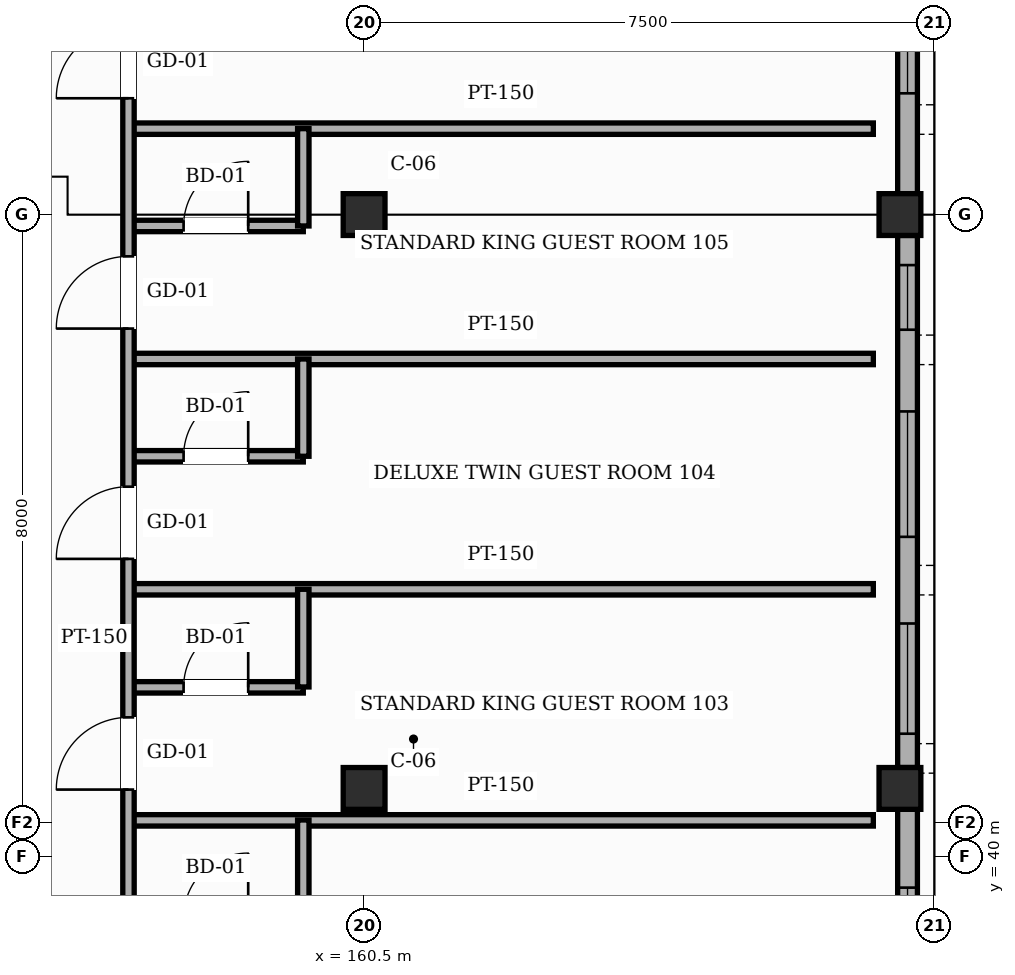
"""IFC4 building model, lengths in metres.
Left out: names, types, materials, properties, quantities, classifications, styles, units other than length and angle.
Written with IfcOpenShell. Run it as: python <this file> out.ifc"""

import sys

from ifc_helpers import new_model, si_unit, direction, frame, frame_2d, origin, origin_2d, place, context, subcontext, project, spatial, rectangle, hollow_rectangle, extrude, element, fill, save


model = new_model("IFC4")
c1 = context("Model", 3, precision=1e-05, world=origin(), true_north=direction((0.0, 1.0)))
c2 = subcontext(c1, "Body", "Model", "MODEL_VIEW")
j1 = project(units=[si_unit("LENGTHUNIT", "METRE"), si_unit("PLANEANGLEUNIT", "RADIAN")], contexts=[c1])
p1 = place(None, origin())
s1 = spatial("IfcSite", under=j1, at=p1, CompositionType="ELEMENT")
p2 = place(p1, origin())
s2 = spatial("IfcBuilding", under=s1, at=p2, CompositionType="ELEMENT")
p3 = place(p2, frame((0.0, 0.0, 24.6)))
s3 = spatial("IfcBuildingStorey", under=s2, at=p3, CompositionType="ELEMENT", Elevation=24.6)
for number, where, z_axis, x_axis in (
    (1, (160.5, 40.9, 0.0), (0.0, 0.0, 1.0), (1.0, 0.0, 0.0)),
    (2, (160.5, 48.45, 0.0), (0.0, 0.0, 1.0), (1.0, 0.0, 0.0)),
    (3, (167.55, 40.9, 0.0), (0.0, 0.0, 1.0), (1.0, 0.0, 0.0)),
    (4, (167.55, 48.45, 0.0), (0.0, 0.0, 1.0), (1.0, 0.0, 0.0)),
):
    element("IfcColumn", number, at=place(p3, frame(where, z_axis=z_axis, x_axis=x_axis)), inside=s3, PredefinedType="COLUMN", context=c2, shape_type="SweptSolid", body=[
        extrude(hollow_rectangle(XDim=0.55, YDim=0.55, WallThickness=0.022, InnerFilletRadius=0.022, OuterFilletRadius=0.044, at=origin_2d()), origin(), (0.0, 0.0, 1.0), 3.6),
    ])
p4 = place(p3, frame((167.65, 40.625, 0.0), z_axis=(0.0, 0.0, 1.0), x_axis=(0.0, -1.0, 0.0)))
e5 = element("IfcWall", 5, at=p4, inside=s3, PredefinedType="SOLIDWALL", context=c2, shape_type="SweptSolid", body=[
    extrude(rectangle(XDim=8.35, YDim=0.26, at=frame_2d((4.175, 0.0))), origin(), (0.0, 0.0, 1.0), 2.755),
])
p5 = place(p4, frame((6.85, 0.0, 0.85)))
e6 = element("IfcOpeningElement", 6, at=p5, cuts=e5, PredefinedType="OPENING", context=c2, shape_type="SweptSolid", body=[
    extrude(rectangle(XDim=0.85, YDim=1.35, at=frame_2d((0.425, 0.675))), frame((0.0, 0.14, 0.0), z_axis=(0.0, -1.0, 0.0), x_axis=(1.0, 0.0, 0.0)), (0.0, 0.0, 1.0), 0.28),
])
p6 = place(p4, frame((3.56, 0.0, 0.85)))
e7 = element("IfcOpeningElement", 7, at=p6, cuts=e5, PredefinedType="OPENING", context=c2, shape_type="SweptSolid", body=[
    extrude(rectangle(XDim=2.25, YDim=1.35, at=frame_2d((1.125, 0.675))), frame((0.0, 0.14, 0.0), z_axis=(0.0, -1.0, 0.0), x_axis=(1.0, 0.0, 0.0)), (0.0, 0.0, 1.0), 0.28),
])
p7 = place(p4, frame((1.03, 0.0, 0.85)))
e8 = element("IfcOpeningElement", 8, at=p7, cuts=e5, PredefinedType="OPENING", context=c2, shape_type="SweptSolid", body=[
    extrude(rectangle(XDim=1.25, YDim=1.35, at=frame_2d((0.625, 0.675))), frame((0.0, 0.14, 0.0), z_axis=(0.0, -1.0, 0.0), x_axis=(1.0, 0.0, 0.0)), (0.0, 0.0, 1.0), 0.28),
])
p8 = place(p3, frame((167.65, 48.175, 0.0), z_axis=(0.0, 0.0, 1.0), x_axis=(0.0, -1.0, 0.0)))
e9 = element("IfcWall", 9, at=p8, inside=s3, PredefinedType="SOLIDWALL", context=c2, shape_type="SweptSolid", body=[
    extrude(rectangle(XDim=7.0, YDim=0.26, at=frame_2d((3.5, 0.0))), origin(), (0.0, 0.0, 1.0), 2.755),
])
p9 = place(p8, frame((5.105, 0.0, 0.85)))
e10 = element("IfcOpeningElement", 10, at=p9, cuts=e9, PredefinedType="OPENING", context=c2, shape_type="SweptSolid", body=[
    extrude(rectangle(XDim=1.45, YDim=1.35, at=frame_2d((0.725, 0.675))), frame((0.0, 0.14, 0.0), z_axis=(0.0, -1.0, 0.0), x_axis=(1.0, 0.0, 0.0)), (0.0, 0.0, 1.0), 0.28),
])
p10 = place(p8, frame((2.315, 0.0, 0.85)))
e11 = element("IfcOpeningElement", 11, at=p10, cuts=e9, PredefinedType="OPENING", context=c2, shape_type="SweptSolid", body=[
    extrude(rectangle(XDim=1.65, YDim=1.35, at=frame_2d((0.825, 0.675))), frame((0.0, 0.14, 0.0), z_axis=(0.0, -1.0, 0.0), x_axis=(1.0, 0.0, 0.0)), (0.0, 0.0, 1.0), 0.28),
])
p11 = place(p8, frame((0.39, 0.0, 0.85)))
e12 = element("IfcOpeningElement", 12, at=p11, cuts=e9, PredefinedType="OPENING", context=c2, shape_type="SweptSolid", body=[
    extrude(rectangle(XDim=0.85, YDim=1.35, at=frame_2d((0.425, 0.675))), frame((0.0, 0.14, 0.0), z_axis=(0.0, -1.0, 0.0), x_axis=(1.0, 0.0, 0.0)), (0.0, 0.0, 1.0), 0.28),
])
p12 = place(p3, frame((167.65, 56.175, 0.0), z_axis=(0.0, 0.0, 1.0), x_axis=(0.0, -1.0, 0.0)))
e13 = element("IfcWall", 13, at=p12, inside=s3, PredefinedType="SOLIDWALL", context=c2, shape_type="SweptSolid", body=[
    extrude(rectangle(XDim=7.45, YDim=0.26, at=frame_2d((3.725, 0.0))), origin(), (0.0, 0.0, 1.0), 2.755),
])
p13 = place(p12, frame((4.03, 0.0, 0.85)))
e14 = element("IfcOpeningElement", 14, at=p13, cuts=e13, PredefinedType="OPENING", context=c2, shape_type="SweptSolid", body=[
    extrude(rectangle(XDim=2.1, YDim=1.35, at=frame_2d((1.05, 0.675))), frame((0.0, 0.14, 0.0), z_axis=(0.0, -1.0, 0.0), x_axis=(1.0, 0.0, 0.0)), (0.0, 0.0, 1.0), 0.28),
])
p14 = place(p12, frame((1.47, 0.0, 0.85)))
e15 = element("IfcOpeningElement", 15, at=p14, cuts=e13, PredefinedType="OPENING", context=c2, shape_type="SweptSolid", body=[
    extrude(rectangle(XDim=1.15, YDim=1.5, at=frame_2d((0.575, 0.75))), frame((0.0, 0.14, 0.0), z_axis=(0.0, -1.0, 0.0), x_axis=(1.0, 0.0, 0.0)), (0.0, 0.0, 1.0), 0.28),
])
p15 = place(p3, frame((157.4, 40.48, 0.0), z_axis=(0.0, 0.0, 1.0), x_axis=(1.0, 0.0, 0.0)))
e16 = element("IfcWall", 16, at=p15, inside=s3, PredefinedType="PARTITIONING", context=c2, shape_type="SweptSolid", body=[
    extrude(rectangle(XDim=9.8, YDim=0.15, at=frame_2d((4.9, 0.0))), origin(), (0.0, 0.0, 1.0), 3.365),
])
p16 = place(p3, frame((157.4, 42.23, 0.0), z_axis=(0.0, 0.0, 1.0), x_axis=(1.0, 0.0, 0.0)))
e17 = element("IfcWall", 17, at=p16, inside=s3, PredefinedType="PARTITIONING", context=c2, shape_type="SweptSolid", body=[
    extrude(rectangle(XDim=2.3, YDim=0.15, at=frame_2d((1.15, 0.0))), origin(), (0.0, 0.0, 1.0), 3.365),
])
p17 = place(p16, frame((0.725, 0.0, 0.0)))
e18 = element("IfcOpeningElement", 18, at=p17, cuts=e17, PredefinedType="OPENING", context=c2, shape_type="SweptSolid", body=[
    extrude(rectangle(XDim=0.85, YDim=2.1, at=frame_2d((0.425, 1.05))), frame((0.0, 0.085, 0.0), z_axis=(0.0, -1.0, 0.0), x_axis=(1.0, 0.0, 0.0)), (0.0, 0.0, 1.0), 0.17),
])
p18 = place(p3, frame((157.4, 43.52, 0.0), z_axis=(0.0, 0.0, 1.0), x_axis=(1.0, 0.0, 0.0)))
e19 = element("IfcWall", 19, at=p18, inside=s3, PredefinedType="PARTITIONING", context=c2, shape_type="SweptSolid", body=[
    extrude(rectangle(XDim=9.8, YDim=0.15, at=frame_2d((4.9, 0.0))), origin(), (0.0, 0.0, 1.0), 3.365),
])
p19 = place(p3, frame((157.4, 45.27, 0.0), z_axis=(0.0, 0.0, 1.0), x_axis=(1.0, 0.0, 0.0)))
e20 = element("IfcWall", 20, at=p19, inside=s3, PredefinedType="PARTITIONING", context=c2, shape_type="SweptSolid", body=[
    extrude(rectangle(XDim=2.3, YDim=0.15, at=frame_2d((1.15, 0.0))), origin(), (0.0, 0.0, 1.0), 3.365),
])
p20 = place(p19, frame((0.725, 0.0, 0.0)))
e21 = element("IfcOpeningElement", 21, at=p20, cuts=e20, PredefinedType="OPENING", context=c2, shape_type="SweptSolid", body=[
    extrude(rectangle(XDim=0.85, YDim=2.1, at=frame_2d((0.425, 1.05))), frame((0.0, 0.085, 0.0), z_axis=(0.0, -1.0, 0.0), x_axis=(1.0, 0.0, 0.0)), (0.0, 0.0, 1.0), 0.17),
])
p21 = place(p3, frame((157.4, 46.55, 0.0), z_axis=(0.0, 0.0, 1.0), x_axis=(1.0, 0.0, 0.0)))
e22 = element("IfcWall", 22, at=p21, inside=s3, PredefinedType="PARTITIONING", context=c2, shape_type="SweptSolid", body=[
    extrude(rectangle(XDim=9.8, YDim=0.15, at=frame_2d((4.9, 0.0))), origin(), (0.0, 0.0, 1.0), 3.365),
])
p22 = place(p3, frame((157.4, 48.3, 0.0), z_axis=(0.0, 0.0, 1.0), x_axis=(1.0, 0.0, 0.0)))
e23 = element("IfcWall", 23, at=p22, inside=s3, PredefinedType="PARTITIONING", context=c2, shape_type="SweptSolid", body=[
    extrude(rectangle(XDim=2.3, YDim=0.15, at=frame_2d((1.15, 0.0))), origin(), (0.0, 0.0, 1.0), 3.365),
])
p23 = place(p22, frame((0.725, 0.0, 0.0)))
e24 = element("IfcOpeningElement", 24, at=p23, cuts=e23, PredefinedType="OPENING", context=c2, shape_type="SweptSolid", body=[
    extrude(rectangle(XDim=0.85, YDim=2.1, at=frame_2d((0.425, 1.05))), frame((0.0, 0.085, 0.0), z_axis=(0.0, -1.0, 0.0), x_axis=(1.0, 0.0, 0.0)), (0.0, 0.0, 1.0), 0.17),
])
p24 = place(p3, frame((157.4, 49.58, 0.0), z_axis=(0.0, 0.0, 1.0), x_axis=(1.0, 0.0, 0.0)))
e25 = element("IfcWall", 25, at=p24, inside=s3, PredefinedType="PARTITIONING", context=c2, shape_type="SweptSolid", body=[
    extrude(rectangle(XDim=9.8, YDim=0.15, at=frame_2d((4.9, 0.0))), origin(), (0.0, 0.0, 1.0), 3.365),
])
p25 = place(p3, frame((157.4, 22.3, 0.0), z_axis=(0.0, 0.0, 1.0), x_axis=(0.0, 1.0, 0.0)))
e26 = element("IfcWall", 26, at=p25, inside=s3, PredefinedType="PARTITIONING", context=c2, shape_type="SweptSolid", body=[
    extrude(rectangle(XDim=48.5, YDim=0.15, at=frame_2d((24.25, 0.0))), origin(), (0.0, 0.0, 1.0), 3.365),
])
p26 = place(p25, frame((0.4, 0.0, 0.0)))
e27 = element("IfcOpeningElement", 27, at=p26, cuts=e26, PredefinedType="OPENING", context=c2, shape_type="SweptSolid", body=[
    extrude(rectangle(XDim=0.95, YDim=2.15, at=frame_2d((0.475, 1.075))), frame((0.0, 0.085, 0.0), z_axis=(0.0, -1.0, 0.0), x_axis=(1.0, 0.0, 0.0)), (0.0, 0.0, 1.0), 0.17),
])
p27 = place(p25, frame((3.43, 0.0, 0.0)))
e28 = element("IfcOpeningElement", 28, at=p27, cuts=e26, PredefinedType="OPENING", context=c2, shape_type="SweptSolid", body=[
    extrude(rectangle(XDim=0.95, YDim=2.15, at=frame_2d((0.475, 1.075))), frame((0.0, 0.085, 0.0), z_axis=(0.0, -1.0, 0.0), x_axis=(1.0, 0.0, 0.0)), (0.0, 0.0, 1.0), 0.17),
])
p28 = place(p25, frame((6.46, 0.0, 0.0)))
e29 = element("IfcOpeningElement", 29, at=p28, cuts=e26, PredefinedType="OPENING", context=c2, shape_type="SweptSolid", body=[
    extrude(rectangle(XDim=0.95, YDim=2.15, at=frame_2d((0.475, 1.075))), frame((0.0, 0.085, 0.0), z_axis=(0.0, -1.0, 0.0), x_axis=(1.0, 0.0, 0.0)), (0.0, 0.0, 1.0), 0.17),
])
p29 = place(p25, frame((9.495, 0.0, 0.0)))
e30 = element("IfcOpeningElement", 30, at=p29, cuts=e26, PredefinedType="OPENING", context=c2, shape_type="SweptSolid", body=[
    extrude(rectangle(XDim=0.95, YDim=2.15, at=frame_2d((0.475, 1.075))), frame((0.0, 0.085, 0.0), z_axis=(0.0, -1.0, 0.0), x_axis=(1.0, 0.0, 0.0)), (0.0, 0.0, 1.0), 0.17),
])
p30 = place(p25, frame((12.525, 0.0, 0.0)))
e31 = element("IfcOpeningElement", 31, at=p30, cuts=e26, PredefinedType="OPENING", context=c2, shape_type="SweptSolid", body=[
    extrude(rectangle(XDim=0.95, YDim=2.15, at=frame_2d((0.475, 1.075))), frame((0.0, 0.085, 0.0), z_axis=(0.0, -1.0, 0.0), x_axis=(1.0, 0.0, 0.0)), (0.0, 0.0, 1.0), 0.17),
])
p31 = place(p25, frame((15.555, 0.0, 0.0)))
e32 = element("IfcOpeningElement", 32, at=p31, cuts=e26, PredefinedType="OPENING", context=c2, shape_type="SweptSolid", body=[
    extrude(rectangle(XDim=0.95, YDim=2.15, at=frame_2d((0.475, 1.075))), frame((0.0, 0.085, 0.0), z_axis=(0.0, -1.0, 0.0), x_axis=(1.0, 0.0, 0.0)), (0.0, 0.0, 1.0), 0.17),
])
p32 = place(p25, frame((18.585, 0.0, 0.0)))
e33 = element("IfcOpeningElement", 33, at=p32, cuts=e26, PredefinedType="OPENING", context=c2, shape_type="SweptSolid", body=[
    extrude(rectangle(XDim=0.95, YDim=2.15, at=frame_2d((0.475, 1.075))), frame((0.0, 0.085, 0.0), z_axis=(0.0, -1.0, 0.0), x_axis=(1.0, 0.0, 0.0)), (0.0, 0.0, 1.0), 0.17),
])
p33 = place(p25, frame((21.62, 0.0, 0.0)))
e34 = element("IfcOpeningElement", 34, at=p33, cuts=e26, PredefinedType="OPENING", context=c2, shape_type="SweptSolid", body=[
    extrude(rectangle(XDim=0.95, YDim=2.15, at=frame_2d((0.475, 1.075))), frame((0.0, 0.085, 0.0), z_axis=(0.0, -1.0, 0.0), x_axis=(1.0, 0.0, 0.0)), (0.0, 0.0, 1.0), 0.17),
])
p34 = place(p25, frame((24.65, 0.0, 0.0)))
e35 = element("IfcOpeningElement", 35, at=p34, cuts=e26, PredefinedType="OPENING", context=c2, shape_type="SweptSolid", body=[
    extrude(rectangle(XDim=0.95, YDim=2.15, at=frame_2d((0.475, 1.075))), frame((0.0, 0.085, 0.0), z_axis=(0.0, -1.0, 0.0), x_axis=(1.0, 0.0, 0.0)), (0.0, 0.0, 1.0), 0.17),
])
p35 = place(p25, frame((27.68, 0.0, 0.0)))
e36 = element("IfcOpeningElement", 36, at=p35, cuts=e26, PredefinedType="OPENING", context=c2, shape_type="SweptSolid", body=[
    extrude(rectangle(XDim=0.95, YDim=2.15, at=frame_2d((0.475, 1.075))), frame((0.0, 0.085, 0.0), z_axis=(0.0, -1.0, 0.0), x_axis=(1.0, 0.0, 0.0)), (0.0, 0.0, 1.0), 0.17),
])
p36 = place(p25, frame((30.71, 0.0, 0.0)))
e37 = element("IfcOpeningElement", 37, at=p36, cuts=e26, PredefinedType="OPENING", context=c2, shape_type="SweptSolid", body=[
    extrude(rectangle(XDim=0.95, YDim=2.15, at=frame_2d((0.475, 1.075))), frame((0.0, 0.085, 0.0), z_axis=(0.0, -1.0, 0.0), x_axis=(1.0, 0.0, 0.0)), (0.0, 0.0, 1.0), 0.17),
])
p37 = place(p25, frame((33.745, 0.0, 0.0)))
e38 = element("IfcOpeningElement", 38, at=p37, cuts=e26, PredefinedType="OPENING", context=c2, shape_type="SweptSolid", body=[
    extrude(rectangle(XDim=0.95, YDim=2.15, at=frame_2d((0.475, 1.075))), frame((0.0, 0.085, 0.0), z_axis=(0.0, -1.0, 0.0), x_axis=(1.0, 0.0, 0.0)), (0.0, 0.0, 1.0), 0.17),
])
p38 = place(p25, frame((36.775, 0.0, 0.0)))
e39 = element("IfcOpeningElement", 39, at=p38, cuts=e26, PredefinedType="OPENING", context=c2, shape_type="SweptSolid", body=[
    extrude(rectangle(XDim=0.95, YDim=2.15, at=frame_2d((0.475, 1.075))), frame((0.0, 0.085, 0.0), z_axis=(0.0, -1.0, 0.0), x_axis=(1.0, 0.0, 0.0)), (0.0, 0.0, 1.0), 0.17),
])
p39 = place(p25, frame((39.805, 0.0, 0.0)))
e40 = element("IfcOpeningElement", 40, at=p39, cuts=e26, PredefinedType="OPENING", context=c2, shape_type="SweptSolid", body=[
    extrude(rectangle(XDim=0.95, YDim=2.15, at=frame_2d((0.475, 1.075))), frame((0.0, 0.085, 0.0), z_axis=(0.0, -1.0, 0.0), x_axis=(1.0, 0.0, 0.0)), (0.0, 0.0, 1.0), 0.17),
])
p40 = place(p25, frame((42.84, 0.0, 0.0)))
e41 = element("IfcOpeningElement", 41, at=p40, cuts=e26, PredefinedType="OPENING", context=c2, shape_type="SweptSolid", body=[
    extrude(rectangle(XDim=0.95, YDim=2.15, at=frame_2d((0.475, 1.075))), frame((0.0, 0.085, 0.0), z_axis=(0.0, -1.0, 0.0), x_axis=(1.0, 0.0, 0.0)), (0.0, 0.0, 1.0), 0.17),
])
p41 = place(p25, frame((45.87, 0.0, 0.0)))
e42 = element("IfcOpeningElement", 42, at=p41, cuts=e26, PredefinedType="OPENING", context=c2, shape_type="SweptSolid", body=[
    extrude(rectangle(XDim=0.95, YDim=2.15, at=frame_2d((0.475, 1.075))), frame((0.0, 0.085, 0.0), z_axis=(0.0, -1.0, 0.0), x_axis=(1.0, 0.0, 0.0)), (0.0, 0.0, 1.0), 0.17),
])
p42 = place(p3, frame((159.7, 39.205, 0.0), z_axis=(0.0, 0.0, 1.0), x_axis=(0.0, 1.0, 0.0)))
e43 = element("IfcWall", 43, at=p42, inside=s3, PredefinedType="PARTITIONING", context=c2, shape_type="SweptSolid", body=[
    extrude(rectangle(XDim=1.28, YDim=0.15, at=frame_2d((0.64, 0.0))), origin(), (0.0, 0.0, 1.0), 3.365),
])
p43 = place(p3, frame((159.7, 42.235, 0.0), z_axis=(0.0, 0.0, 1.0), x_axis=(0.0, 1.0, 0.0)))
e44 = element("IfcWall", 44, at=p43, inside=s3, PredefinedType="PARTITIONING", context=c2, shape_type="SweptSolid", body=[
    extrude(rectangle(XDim=1.285, YDim=0.15, at=frame_2d((0.643, 0.0))), origin(), (0.0, 0.0, 1.0), 3.365),
])
for number, where, z_axis, x_axis in (
    (45, (159.7, 45.27, 0.0), (0.0, 0.0, 1.0), (0.0, 1.0, 0.0)),
    (46, (159.7, 48.3, 0.0), (0.0, 0.0, 1.0), (0.0, 1.0, 0.0)),
):
    element("IfcWall", number, at=place(p3, frame(where, z_axis=z_axis, x_axis=x_axis)), inside=s3, PredefinedType="PARTITIONING", context=c2, shape_type="SweptSolid", body=[
        extrude(rectangle(XDim=1.28, YDim=0.15, at=frame_2d((0.64, 0.0))), origin(), (0.0, 0.0, 1.0), 3.365),
    ])
p44 = place(p7, origin())
e47 = element("IfcWindow", 47, at=p44, inside=s3, PartitioningType="SINGLE_PANEL", PredefinedType="WINDOW", context=c2, shape_type="SweptSolid", body=[
    extrude(rectangle(XDim=1.25, YDim=1.35, at=frame_2d((0.625, 0.675))), frame((0.0, 0.03, 0.0), z_axis=(0.0, -1.0, 0.0), x_axis=(1.0, 0.0, 0.0)), (0.0, 0.0, 1.0), 0.06),
])
fill(e8, e47)
p45 = place(p9, origin())
e48 = element("IfcWindow", 48, at=p45, inside=s3, PartitioningType="SINGLE_PANEL", PredefinedType="WINDOW", context=c2, shape_type="SweptSolid", body=[
    extrude(rectangle(XDim=1.45, YDim=1.35, at=frame_2d((0.725, 0.675))), frame((0.0, 0.03, 0.0), z_axis=(0.0, -1.0, 0.0), x_axis=(1.0, 0.0, 0.0)), (0.0, 0.0, 1.0), 0.06),
])
fill(e10, e48)
p46 = place(p10, origin())
e49 = element("IfcWindow", 49, at=p46, inside=s3, PartitioningType="SINGLE_PANEL", PredefinedType="WINDOW", context=c2, shape_type="SweptSolid", body=[
    extrude(rectangle(XDim=1.65, YDim=1.35, at=frame_2d((0.825, 0.675))), frame((0.0, 0.03, 0.0), z_axis=(0.0, -1.0, 0.0), x_axis=(1.0, 0.0, 0.0)), (0.0, 0.0, 1.0), 0.06),
])
fill(e11, e49)
p47 = place(p11, origin())
e50 = element("IfcWindow", 50, at=p47, inside=s3, PartitioningType="SINGLE_PANEL", PredefinedType="WINDOW", context=c2, shape_type="SweptSolid", body=[
    extrude(rectangle(XDim=0.85, YDim=1.35, at=frame_2d((0.425, 0.675))), frame((0.0, 0.03, 0.0), z_axis=(0.0, -1.0, 0.0), x_axis=(1.0, 0.0, 0.0)), (0.0, 0.0, 1.0), 0.06),
])
fill(e12, e50)
p48 = place(p13, origin())
e51 = element("IfcWindow", 51, at=p48, inside=s3, PartitioningType="SINGLE_PANEL", PredefinedType="WINDOW", context=c2, shape_type="SweptSolid", body=[
    extrude(rectangle(XDim=2.1, YDim=1.35, at=frame_2d((1.05, 0.675))), frame((0.0, 0.03, 0.0), z_axis=(0.0, -1.0, 0.0), x_axis=(1.0, 0.0, 0.0)), (0.0, 0.0, 1.0), 0.06),
])
fill(e14, e51)
p49 = place(p32, origin())
e52 = element("IfcDoor", 52, at=p49, inside=s3, OperationType="SINGLE_SWING_LEFT", PredefinedType="DOOR", context=c2, shape_type="SweptSolid", body=[
    extrude(rectangle(XDim=0.95, YDim=2.15, at=frame_2d((0.475, 1.075))), frame((0.0, 0.025, 0.0), z_axis=(0.0, -1.0, 0.0), x_axis=(1.0, 0.0, 0.0)), (0.0, 0.0, 1.0), 0.05),
])
fill(e33, e52)
p50 = place(p17, origin())
e53 = element("IfcDoor", 53, at=p50, inside=s3, OperationType="SINGLE_SWING_RIGHT", PredefinedType="DOOR", context=c2, shape_type="SweptSolid", body=[
    extrude(rectangle(XDim=0.85, YDim=2.1, at=frame_2d((0.425, 1.05))), frame((0.0, 0.025, 0.0), z_axis=(0.0, -1.0, 0.0), x_axis=(1.0, 0.0, 0.0)), (0.0, 0.0, 1.0), 0.05),
])
fill(e18, e53)
p51 = place(p33, origin())
e54 = element("IfcDoor", 54, at=p51, inside=s3, OperationType="SINGLE_SWING_LEFT", PredefinedType="DOOR", context=c2, shape_type="SweptSolid", body=[
    extrude(rectangle(XDim=0.95, YDim=2.15, at=frame_2d((0.475, 1.075))), frame((0.0, 0.025, 0.0), z_axis=(0.0, -1.0, 0.0), x_axis=(1.0, 0.0, 0.0)), (0.0, 0.0, 1.0), 0.05),
])
fill(e34, e54)
p52 = place(p20, origin())
e55 = element("IfcDoor", 55, at=p52, inside=s3, OperationType="SINGLE_SWING_RIGHT", PredefinedType="DOOR", context=c2, shape_type="SweptSolid", body=[
    extrude(rectangle(XDim=0.85, YDim=2.1, at=frame_2d((0.425, 1.05))), frame((0.0, 0.025, 0.0), z_axis=(0.0, -1.0, 0.0), x_axis=(1.0, 0.0, 0.0)), (0.0, 0.0, 1.0), 0.05),
])
fill(e21, e55)
p53 = place(p34, origin())
e56 = element("IfcDoor", 56, at=p53, inside=s3, OperationType="SINGLE_SWING_LEFT", PredefinedType="DOOR", context=c2, shape_type="SweptSolid", body=[
    extrude(rectangle(XDim=0.95, YDim=2.15, at=frame_2d((0.475, 1.075))), frame((0.0, 0.025, 0.0), z_axis=(0.0, -1.0, 0.0), x_axis=(1.0, 0.0, 0.0)), (0.0, 0.0, 1.0), 0.05),
])
fill(e35, e56)
p54 = place(p23, origin())
e57 = element("IfcDoor", 57, at=p54, inside=s3, OperationType="SINGLE_SWING_RIGHT", PredefinedType="DOOR", context=c2, shape_type="SweptSolid", body=[
    extrude(rectangle(XDim=0.85, YDim=2.1, at=frame_2d((0.425, 1.05))), frame((0.0, 0.025, 0.0), z_axis=(0.0, -1.0, 0.0), x_axis=(1.0, 0.0, 0.0)), (0.0, 0.0, 1.0), 0.05),
])
fill(e24, e57)
p55 = place(p35, origin())
e58 = element("IfcDoor", 58, at=p55, inside=s3, OperationType="SINGLE_SWING_LEFT", PredefinedType="DOOR", context=c2, shape_type="SweptSolid", body=[
    extrude(rectangle(XDim=0.95, YDim=2.15, at=frame_2d((0.475, 1.075))), frame((0.0, 0.025, 0.0), z_axis=(0.0, -1.0, 0.0), x_axis=(1.0, 0.0, 0.0)), (0.0, 0.0, 1.0), 0.05),
])
fill(e36, e58)
save(model, sys.argv[1])
